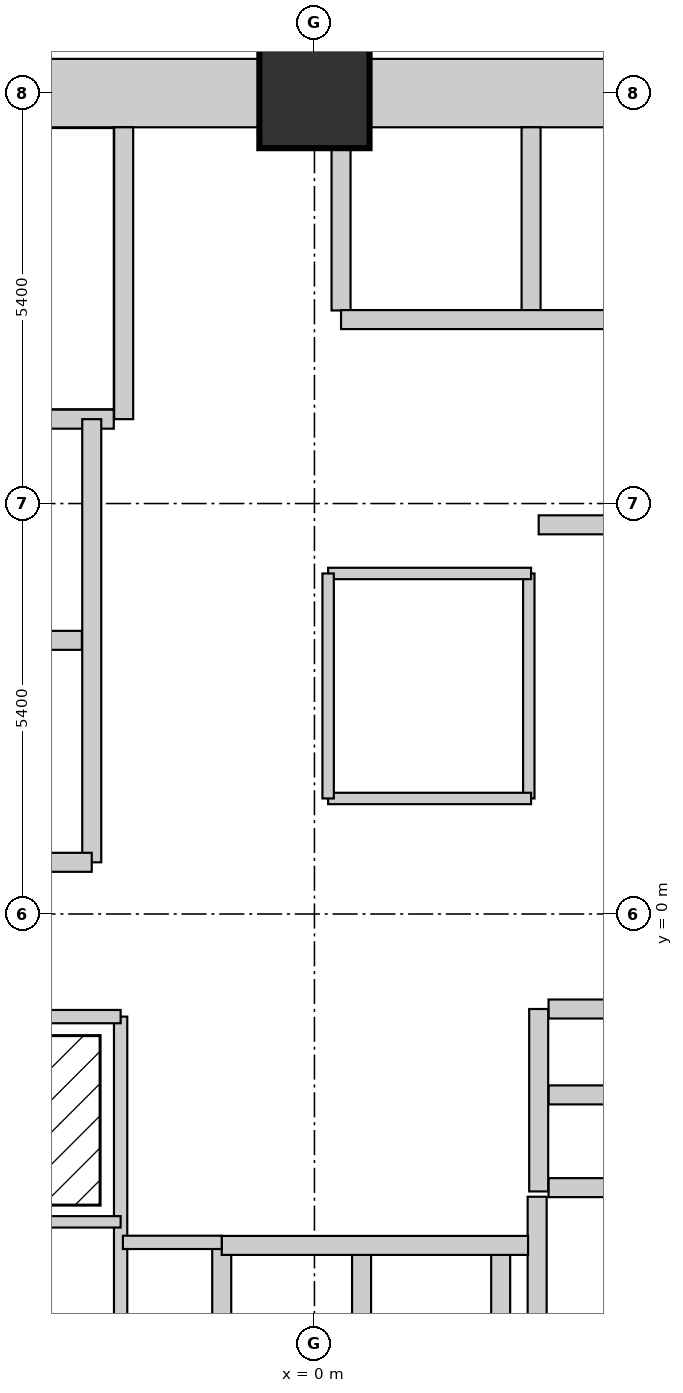
"""IFC4 building model, lengths in metres.
Left out: names, types, materials, properties, quantities, classifications, styles, units other than length and angle.
Written with IfcOpenShell. Run it as: python <this file> out.ifc"""

import sys

from ifc_helpers import new_model, si_unit, direction, frame, frame_2d, origin, origin_2d, place, context, subcontext, project, spatial, rectangle, extrude, element, fill, save


model = new_model("IFC4")
c1 = context("Model", 3, precision=1e-05, world=origin(), true_north=direction((0.0, 1.0)))
c2 = subcontext(c1, "Body", "Model", "MODEL_VIEW")
j1 = project(units=[si_unit("LENGTHUNIT", "METRE"), si_unit("PLANEANGLEUNIT", "RADIAN")], contexts=[c1])
p1 = place(None, origin())
s1 = spatial("IfcSite", under=j1, at=p1, CompositionType="ELEMENT")
p2 = place(p1, origin())
s2 = spatial("IfcBuilding", under=s1, at=p2, CompositionType="ELEMENT")
p3 = place(p2, origin())
s3 = spatial("IfcBuildingStorey", under=s2, at=p3, CompositionType="ELEMENT", Elevation=0.0)
p4 = place(p3, frame((0.0, 10.8, 0.0), z_axis=(0.0, 0.0, 1.0), x_axis=(1.0, 0.0, 0.0)))
e1 = element("IfcColumn", 1, at=p4, inside=s3, PredefinedType="COLUMN", context=c2, shape_type="SweptSolid", body=[
    extrude(rectangle(XDim=1.45, YDim=1.45, at=origin_2d()), origin(), (0.0, 0.0, 1.0), 4.5),
])
p5 = place(p3, frame((-4.665, 10.8, 0.0), z_axis=(0.0, 0.0, 1.0), x_axis=(1.0, 0.0, 0.0)))
e2 = element("IfcWall", 2, at=p5, inside=s3, PredefinedType="SHEAR", context=c2, shape_type="SweptSolid", body=[
    extrude(rectangle(XDim=3.93, YDim=0.9, at=frame_2d((1.965, 0.0))), origin(), (0.0, 0.0, 1.0), 4.5),
])
p6 = place(p5, frame((2.58, 0.0, 0.0)))
e3 = element("IfcOpeningElement", 3, at=p6, cuts=e2, PredefinedType="OPENING", context=c2, shape_type="SweptSolid", body=[
    extrude(rectangle(XDim=1.1, YDim=2.1, at=frame_2d((0.55, 1.05))), frame((0.0, 0.46, 0.0), z_axis=(0.0, -1.0, 0.0), x_axis=(1.0, 0.0, 0.0)), (0.0, 0.0, 1.0), 0.92),
])
p7 = place(p3, frame((0.735, 10.8, 0.0), z_axis=(0.0, 0.0, 1.0), x_axis=(1.0, 0.0, 0.0)))
e4 = element("IfcWall", 4, at=p7, inside=s3, PredefinedType="SHEAR", context=c2, shape_type="SweptSolid", body=[
    extrude(rectangle(XDim=3.93, YDim=0.9, at=frame_2d((1.965, 0.0))), origin(), (0.0, 0.0, 1.0), 4.5),
])
p8 = place(p3, frame((2.93, -6.51, 0.0), z_axis=(0.0, 0.0, 1.0), x_axis=(0.0, 1.0, 0.0)))
e5 = element("IfcWall", 5, at=p8, inside=s3, PredefinedType="SHEAR", context=c2, shape_type="SweptSolid", body=[
    extrude(rectangle(XDim=2.79, YDim=0.25, at=frame_2d((1.395, 0.0))), origin(), (0.0, 0.0, 1.0), 4.5),
])
p9 = place(p3, frame((3.08, -3.6, 0.0), z_axis=(0.0, 0.0, 1.0), x_axis=(1.0, 0.0, 0.0)))
e6 = element("IfcWall", 6, at=p9, inside=s3, PredefinedType="SHEAR", context=c2, shape_type="SweptSolid", body=[
    extrude(rectangle(XDim=2.37, YDim=0.25, at=frame_2d((1.185, 0.0))), origin(), (0.0, 0.0, 1.0), 4.5),
])
for number, where, z_axis, x_axis in (
    (7, (0.62, -6.34, 0.0), (0.0, 0.0, 1.0), (0.0, 1.0, 0.0)),
    (8, (2.45, -6.34, 0.0), (0.0, 0.0, 1.0), (0.0, 1.0, 0.0)),
):
    element("IfcWall", number, at=place(p3, frame(where, z_axis=z_axis, x_axis=x_axis)), inside=s3, PredefinedType="SHEAR", context=c2, shape_type="SweptSolid", body=[
        extrude(rectangle(XDim=1.88, YDim=0.25, at=frame_2d((0.94, 0.0))), origin(), (0.0, 0.0, 1.0), 4.5),
    ])
p10 = place(p3, frame((-1.22, -6.44, 0.0), z_axis=(0.0, 0.0, 1.0), x_axis=(0.0, 1.0, 0.0)))
e9 = element("IfcWall", 9, at=p10, inside=s3, PredefinedType="SHEAR", context=c2, shape_type="SweptSolid", body=[
    extrude(rectangle(XDim=2.08, YDim=0.25, at=frame_2d((1.04, 0.0))), origin(), (0.0, 0.0, 1.0), 4.5),
])
p11 = place(p3, frame((-1.22, -4.36, 0.0), z_axis=(0.0, 0.0, 1.0), x_axis=(1.0, 0.0, 0.0)))
e10 = element("IfcWall", 10, at=p11, inside=s3, PredefinedType="SHEAR", context=c2, shape_type="SweptSolid", body=[
    extrude(rectangle(XDim=4.03, YDim=0.25, at=frame_2d((2.015, 0.0))), origin(), (0.0, 0.0, 1.0), 4.5),
])
p12 = place(p3, frame((2.85, 7.94, 0.0), z_axis=(0.0, 0.0, 1.0), x_axis=(0.0, 1.0, 0.0)))
e11 = element("IfcWall", 11, at=p12, inside=s3, PredefinedType="SHEAR", context=c2, shape_type="SweptSolid", body=[
    extrude(rectangle(XDim=2.41, YDim=0.25, at=frame_2d((1.205, 0.0))), origin(), (0.0, 0.0, 1.0), 4.5),
])
p13 = place(p3, frame((0.35, 7.94, 0.0), z_axis=(0.0, 0.0, 1.0), x_axis=(0.0, 1.0, 0.0)))
e12 = element("IfcWall", 12, at=p13, inside=s3, PredefinedType="SHEAR", context=c2, shape_type="SweptSolid", body=[
    extrude(rectangle(XDim=2.135, YDim=0.25, at=frame_2d((1.067, 0.0))), origin(), (0.0, 0.0, 1.0), 4.5),
])
p14 = place(p3, frame((0.35, 7.82, 0.0), z_axis=(0.0, 0.0, 1.0), x_axis=(1.0, 0.0, 0.0)))
e13 = element("IfcWall", 13, at=p14, inside=s3, PredefinedType="SHEAR", context=c2, shape_type="SweptSolid", body=[
    extrude(rectangle(XDim=10.0, YDim=0.25, at=frame_2d((5.0, 0.0))), origin(), (0.0, 0.0, 1.0), 4.5),
])
p15 = place(p14, frame((0.7, 0.0, 0.0)))
e14 = element("IfcOpeningElement", 14, at=p15, cuts=e13, PredefinedType="OPENING", context=c2, shape_type="SweptSolid", body=[
    extrude(rectangle(XDim=1.1, YDim=2.1, at=frame_2d((0.55, 1.05))), frame((0.0, 0.135, 0.0), z_axis=(0.0, -1.0, 0.0), x_axis=(1.0, 0.0, 0.0)), (0.0, 0.0, 1.0), 0.27),
])
p16 = place(p14, frame((3.2, 0.0, 0.0)))
e15 = element("IfcOpeningElement", 15, at=p16, cuts=e13, PredefinedType="OPENING", context=c2, shape_type="SweptSolid", body=[
    extrude(rectangle(XDim=1.1, YDim=2.1, at=frame_2d((0.55, 1.05))), frame((0.0, 0.135, 0.0), z_axis=(0.0, -1.0, 0.0), x_axis=(1.0, 0.0, 0.0)), (0.0, 0.0, 1.0), 0.27),
])
p17 = place(p14, frame((5.7, 0.0, 0.0)))
e16 = element("IfcOpeningElement", 16, at=p17, cuts=e13, PredefinedType="OPENING", context=c2, shape_type="SweptSolid", body=[
    extrude(rectangle(XDim=1.1, YDim=2.1, at=frame_2d((0.55, 1.05))), frame((0.0, 0.135, 0.0), z_axis=(0.0, -1.0, 0.0), x_axis=(1.0, 0.0, 0.0)), (0.0, 0.0, 1.0), 0.27),
])
p18 = place(p14, frame((8.2, 0.0, 0.0)))
e17 = element("IfcOpeningElement", 17, at=p18, cuts=e13, PredefinedType="OPENING", context=c2, shape_type="SweptSolid", body=[
    extrude(rectangle(XDim=1.1, YDim=2.1, at=frame_2d((0.55, 1.05))), frame((0.0, 0.135, 0.0), z_axis=(0.0, -1.0, 0.0), x_axis=(1.0, 0.0, 0.0)), (0.0, 0.0, 1.0), 0.27),
])
p19 = place(p3, frame((2.95, 5.12, 0.0), z_axis=(0.0, 0.0, 1.0), x_axis=(1.0, 0.0, 0.0)))
e18 = element("IfcWall", 18, at=p19, inside=s3, PredefinedType="SHEAR", context=c2, shape_type="SweptSolid", body=[
    extrude(rectangle(XDim=7.125, YDim=0.25, at=frame_2d((3.562, 0.0))), origin(), (0.0, 0.0, 1.0), 4.5),
])
for number, where, z_axis, x_axis in (
    (19, (3.08, -2.38, 0.0), (0.0, 0.0, 1.0), (1.0, 0.0, 0.0)),
    (20, (3.08, -1.25, 0.0), (0.0, 0.0, 1.0), (1.0, 0.0, 0.0)),
):
    element("IfcWall", number, at=place(p3, frame(where, z_axis=z_axis, x_axis=x_axis)), inside=s3, PredefinedType="SHEAR", context=c2, shape_type="SweptSolid", body=[
        extrude(rectangle(XDim=2.37, YDim=0.25, at=frame_2d((1.185, 0.0))), origin(), (0.0, 0.0, 1.0), 4.5),
    ])
p20 = place(p3, frame((2.95, -3.65, 0.0), z_axis=(0.0, 0.0, 1.0), x_axis=(0.0, 1.0, 0.0)))
e21 = element("IfcWall", 21, at=p20, inside=s3, PredefinedType="SHEAR", context=c2, shape_type="SweptSolid", body=[
    extrude(rectangle(XDim=2.4, YDim=0.25, at=frame_2d((1.2, 0.0))), origin(), (0.0, 0.0, 1.0), 4.5),
])
p21 = place(p20, frame((0.775, 0.0, 0.0)))
e22 = element("IfcOpeningElement", 22, at=p21, cuts=e21, PredefinedType="OPENING", context=c2, shape_type="SweptSolid", body=[
    extrude(rectangle(XDim=0.85, YDim=2.1, at=frame_2d((0.425, 1.05))), frame((0.0, 0.135, 0.0), z_axis=(0.0, -1.0, 0.0), x_axis=(1.0, 0.0, 0.0)), (0.0, 0.0, 1.0), 0.27),
])
p22 = place(p3, frame((-2.51, 6.51, 0.0), z_axis=(0.0, 0.0, 1.0), x_axis=(0.0, 1.0, 0.0)))
e23 = element("IfcWall", 23, at=p22, inside=s3, PredefinedType="SHEAR", context=c2, shape_type="SweptSolid", body=[
    extrude(rectangle(XDim=3.84, YDim=0.25, at=frame_2d((1.92, 0.0))), origin(), (0.0, 0.0, 1.0), 4.5),
])
p23 = place(p3, frame((-10.34, 6.51, 0.0), z_axis=(0.0, 0.0, 1.0), x_axis=(1.0, 0.0, 0.0)))
e24 = element("IfcWall", 24, at=p23, inside=s3, PredefinedType="SHEAR", context=c2, shape_type="SweptSolid", body=[
    extrude(rectangle(XDim=7.7, YDim=0.25, at=frame_2d((3.85, 0.0))), origin(), (0.0, 0.0, 1.0), 4.5),
])
p24 = place(p23, frame((0.35, 0.0, 0.0)))
e25 = element("IfcOpeningElement", 25, at=p24, cuts=e24, PredefinedType="OPENING", context=c2, shape_type="SweptSolid", body=[
    extrude(rectangle(XDim=1.1, YDim=2.1, at=frame_2d((0.55, 1.05))), frame((0.0, 0.135, 0.0), z_axis=(0.0, -1.0, 0.0), x_axis=(1.0, 0.0, 0.0)), (0.0, 0.0, 1.0), 0.27),
])
p25 = place(p3, frame((-2.93, 0.68, 0.0), z_axis=(0.0, 0.0, 1.0), x_axis=(0.0, 1.0, 0.0)))
e26 = element("IfcWall", 26, at=p25, inside=s3, PredefinedType="SHEAR", context=c2, shape_type="SweptSolid", body=[
    extrude(rectangle(XDim=5.83, YDim=0.25, at=frame_2d((2.915, 0.0))), origin(), (0.0, 0.0, 1.0), 4.5),
])
p26 = place(p25, frame((0.75, 0.0, 0.0)))
e27 = element("IfcOpeningElement", 27, at=p26, cuts=e26, PredefinedType="OPENING", context=c2, shape_type="SweptSolid", body=[
    extrude(rectangle(XDim=1.2, YDim=2.1, at=frame_2d((0.6, 1.05))), frame((0.0, 0.135, 0.0), z_axis=(0.0, -1.0, 0.0), x_axis=(1.0, 0.0, 0.0)), (0.0, 0.0, 1.0), 0.27),
])
p27 = place(p3, frame((-5.45, 3.6, 0.0), z_axis=(0.0, 0.0, 1.0), x_axis=(1.0, 0.0, 0.0)))
e28 = element("IfcWall", 28, at=p27, inside=s3, PredefinedType="SHEAR", context=c2, shape_type="SweptSolid", body=[
    extrude(rectangle(XDim=2.39, YDim=0.25, at=frame_2d((1.195, 0.0))), origin(), (0.0, 0.0, 1.0), 4.5),
])
p28 = place(p3, frame((-5.58, 0.68, 0.0), z_axis=(0.0, 0.0, 1.0), x_axis=(1.0, 0.0, 0.0)))
e29 = element("IfcWall", 29, at=p28, inside=s3, PredefinedType="SHEAR", context=c2, shape_type="SweptSolid", body=[
    extrude(rectangle(XDim=2.65, YDim=0.25, at=frame_2d((1.325, 0.0))), origin(), (0.0, 0.0, 1.0), 4.5),
])
p29 = place(p3, frame((2.82, 1.52, 0.0), z_axis=(0.0, 0.0, 1.0), x_axis=(0.0, 1.0, 0.0)))
e30 = element("IfcWall", 30, at=p29, inside=s3, PredefinedType="PARTITIONING", context=c2, shape_type="SweptSolid", body=[
    extrude(rectangle(XDim=2.96, YDim=0.15, at=frame_2d((1.48, 0.0))), origin(), (0.0, 0.0, 1.0), 4.2),
])
for number, where, z_axis, x_axis in (
    (31, (0.18, 4.48, 0.0), (0.0, 0.0, 1.0), (1.0, 0.0, 0.0)),
    (32, (0.18, 1.52, 0.0), (0.0, 0.0, 1.0), (1.0, 0.0, 0.0)),
):
    element("IfcWall", number, at=place(p3, frame(where, z_axis=z_axis, x_axis=x_axis)), inside=s3, PredefinedType="PARTITIONING", context=c2, shape_type="SweptSolid", body=[
        extrude(rectangle(XDim=2.67, YDim=0.15, at=frame_2d((1.335, 0.0))), origin(), (0.0, 0.0, 1.0), 4.2),
    ])
p30 = place(p3, frame((0.18, 1.52, 0.0), z_axis=(0.0, 0.0, 1.0), x_axis=(0.0, 1.0, 0.0)))
e33 = element("IfcWall", 33, at=p30, inside=s3, PredefinedType="PARTITIONING", context=c2, shape_type="SweptSolid", body=[
    extrude(rectangle(XDim=2.96, YDim=0.15, at=frame_2d((1.48, 0.0))), origin(), (0.0, 0.0, 1.0), 4.2),
])
p31 = place(p30, frame((0.95, 0.0, 0.0)))
e34 = element("IfcOpeningElement", 34, at=p31, cuts=e33, PredefinedType="OPENING", context=c2, shape_type="SweptSolid", body=[
    extrude(rectangle(XDim=0.85, YDim=2.1, at=frame_2d((0.425, 1.05))), frame((0.0, 0.085, 0.0), z_axis=(0.0, -1.0, 0.0), x_axis=(1.0, 0.0, 0.0)), (0.0, 0.0, 1.0), 0.17),
])
p32 = place(p3, frame((-2.55, -6.51, 0.0), z_axis=(0.0, 0.0, 1.0), x_axis=(0.0, 1.0, 0.0)))
e35 = element("IfcWall", 35, at=p32, inside=s3, PredefinedType="PARTITIONING", context=c2, shape_type="SweptSolid", body=[
    extrude(rectangle(XDim=5.16, YDim=0.175, at=frame_2d((2.58, 0.0))), origin(), (0.0, 0.0, 1.0), 4.2),
])
p33 = place(p32, frame((3.3, 0.0, 0.0)))
e36 = element("IfcOpeningElement", 36, at=p33, cuts=e35, PredefinedType="OPENING", context=c2, shape_type="SweptSolid", body=[
    extrude(rectangle(XDim=0.85, YDim=2.1, at=frame_2d((0.425, 1.05))), frame((0.0, 0.097, 0.0), z_axis=(0.0, -1.0, 0.0), x_axis=(1.0, 0.0, 0.0)), (0.0, 0.0, 1.0), 0.195),
])
p34 = place(p3, frame((-7.18, -4.05, 0.0), z_axis=(0.0, 0.0, 1.0), x_axis=(1.0, 0.0, 0.0)))
e37 = element("IfcWall", 37, at=p34, inside=s3, PredefinedType="PARTITIONING", context=c2, shape_type="SweptSolid", body=[
    extrude(rectangle(XDim=4.63, YDim=0.15, at=frame_2d((2.315, 0.0))), origin(), (0.0, 0.0, 1.0), 4.2),
])
p35 = place(p34, frame((1.0, 0.0, 0.0)))
e38 = element("IfcOpeningElement", 38, at=p35, cuts=e37, PredefinedType="OPENING", context=c2, shape_type="SweptSolid", body=[
    extrude(rectangle(XDim=0.85, YDim=2.1, at=frame_2d((0.425, 1.05))), frame((0.0, 0.085, 0.0), z_axis=(0.0, -1.0, 0.0), x_axis=(1.0, 0.0, 0.0)), (0.0, 0.0, 1.0), 0.17),
])
p36 = place(p3, frame((-7.18, -1.35, 0.0), z_axis=(0.0, 0.0, 1.0), x_axis=(1.0, 0.0, 0.0)))
e39 = element("IfcWall", 39, at=p36, inside=s3, PredefinedType="PARTITIONING", context=c2, shape_type="SweptSolid", body=[
    extrude(rectangle(XDim=4.63, YDim=0.175, at=frame_2d((2.315, 0.0))), origin(), (0.0, 0.0, 1.0), 4.2),
])
p37 = place(p3, frame((-2.52, -4.32, 0.0), z_axis=(0.0, 0.0, 1.0), x_axis=(1.0, 0.0, 0.0)))
e40 = element("IfcWall", 40, at=p37, inside=s3, PredefinedType="PARTITIONING", context=c2, shape_type="SweptSolid", body=[
    extrude(rectangle(XDim=1.3, YDim=0.175, at=frame_2d((0.65, 0.0))), origin(), (0.0, 0.0, 1.0), 4.2),
])
p38 = place(p37, frame((0.22, 0.0, 0.0)))
e41 = element("IfcOpeningElement", 41, at=p38, cuts=e40, PredefinedType="OPENING", context=c2, shape_type="SweptSolid", body=[
    extrude(rectangle(XDim=0.85, YDim=2.1, at=frame_2d((0.425, 1.05))), frame((0.0, 0.097, 0.0), z_axis=(0.0, -1.0, 0.0), x_axis=(1.0, 0.0, 0.0)), (0.0, 0.0, 1.0), 0.195),
])
p39 = place(p31, origin())
e42 = element("IfcDoor", 42, at=p39, inside=s3, OperationType="SINGLE_SWING_RIGHT", PredefinedType="DOOR", context=c2, shape_type="SweptSolid", body=[
    extrude(rectangle(XDim=0.85, YDim=2.1, at=frame_2d((0.425, 1.05))), frame((0.0, 0.025, 0.0), z_axis=(0.0, -1.0, 0.0), x_axis=(1.0, 0.0, 0.0)), (0.0, 0.0, 1.0), 0.05),
])
fill(e34, e42)
p40 = place(p21, origin())
e43 = element("IfcDoor", 43, at=p40, inside=s3, OperationType="SINGLE_SWING_LEFT", PredefinedType="DOOR", context=c2, shape_type="SweptSolid", body=[
    extrude(rectangle(XDim=0.85, YDim=2.1, at=frame_2d((0.425, 1.05))), frame((0.0, 0.025, 0.0), z_axis=(0.0, -1.0, 0.0), x_axis=(1.0, 0.0, 0.0)), (0.0, 0.0, 1.0), 0.05),
])
fill(e22, e43)
p41 = place(p6, origin())
e44 = element("IfcDoor", 44, at=p41, inside=s3, OperationType="SINGLE_SWING_LEFT", PredefinedType="DOOR", context=c2, shape_type="SweptSolid", body=[
    extrude(rectangle(XDim=1.1, YDim=2.1, at=frame_2d((0.55, 1.05))), frame((0.0, 0.025, 0.0), z_axis=(0.0, -1.0, 0.0), x_axis=(1.0, 0.0, 0.0)), (0.0, 0.0, 1.0), 0.05),
])
fill(e3, e44)
p42 = place(p26, origin())
e45 = element("IfcDoor", 45, at=p42, inside=s3, OperationType="SLIDING_TO_LEFT", PredefinedType="DOOR", context=c2, shape_type="SweptSolid", body=[
    extrude(rectangle(XDim=1.2, YDim=2.1, at=frame_2d((0.6, 1.05))), frame((0.0, 0.025, 0.0), z_axis=(0.0, -1.0, 0.0), x_axis=(1.0, 0.0, 0.0)), (0.0, 0.0, 1.0), 0.05),
])
fill(e27, e45)
p43 = place(p15, origin())
e46 = element("IfcDoor", 46, at=p43, inside=s3, OperationType="SLIDING_TO_LEFT", PredefinedType="DOOR", context=c2, shape_type="SweptSolid", body=[
    extrude(rectangle(XDim=1.1, YDim=2.1, at=frame_2d((0.55, 1.05))), frame((0.0, 0.025, 0.0), z_axis=(0.0, -1.0, 0.0), x_axis=(1.0, 0.0, 0.0)), (0.0, 0.0, 1.0), 0.05),
])
fill(e14, e46)
p44 = place(p16, origin())
e47 = element("IfcDoor", 47, at=p44, inside=s3, OperationType="SLIDING_TO_LEFT", PredefinedType="DOOR", context=c2, shape_type="SweptSolid", body=[
    extrude(rectangle(XDim=1.1, YDim=2.1, at=frame_2d((0.55, 1.05))), frame((0.0, 0.025, 0.0), z_axis=(0.0, -1.0, 0.0), x_axis=(1.0, 0.0, 0.0)), (0.0, 0.0, 1.0), 0.05),
])
fill(e15, e47)
p45 = place(p38, origin())
e48 = element("IfcDoor", 48, at=p45, inside=s3, OperationType="SINGLE_SWING_LEFT", PredefinedType="DOOR", context=c2, shape_type="SweptSolid", body=[
    extrude(rectangle(XDim=0.85, YDim=2.1, at=frame_2d((0.425, 1.05))), frame((0.0, 0.025, 0.0), z_axis=(0.0, -1.0, 0.0), x_axis=(1.0, 0.0, 0.0)), (0.0, 0.0, 1.0), 0.05),
])
fill(e41, e48)
p46 = place(p33, origin())
e49 = element("IfcDoor", 49, at=p46, inside=s3, OperationType="SINGLE_SWING_LEFT", PredefinedType="DOOR", context=c2, shape_type="SweptSolid", body=[
    extrude(rectangle(XDim=0.85, YDim=2.1, at=frame_2d((0.425, 1.05))), frame((0.0, 0.025, 0.0), z_axis=(0.0, -1.0, 0.0), x_axis=(1.0, 0.0, 0.0)), (0.0, 0.0, 1.0), 0.05),
])
fill(e36, e49)
save(model, sys.argv[1])
